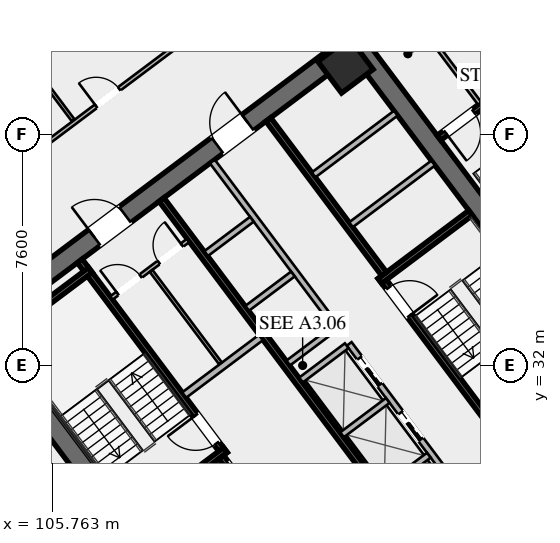
"""IFC4 building model, lengths in metres.
Left out: names, types, materials, properties, quantities, classifications, styles, units other than length and angle.
Written with IfcOpenShell. Run it as: python <this file> out.ifc"""

import sys

from ifc_helpers import new_model, si_unit, direction, frame, frame_2d, origin, origin_2d, place, context, subcontext, project, spatial, rectangle, hollow_rectangle, extrude, element, fill, save


model = new_model("IFC4")
c1 = context("Model", 3, precision=1e-05, world=origin(), true_north=direction((0.0, 1.0)))
c2 = subcontext(c1, "Body", "Model", "MODEL_VIEW")
j1 = project(units=[si_unit("LENGTHUNIT", "METRE"), si_unit("PLANEANGLEUNIT", "RADIAN")], contexts=[c1])
p1 = place(None, origin())
s1 = spatial("IfcSite", under=j1, at=p1, CompositionType="ELEMENT")
p2 = place(p1, origin())
s2 = spatial("IfcBuilding", under=s1, at=p2, CompositionType="ELEMENT")
p3 = place(p2, frame((0.0, 0.0, 67.2)))
s3 = spatial("IfcBuildingStorey", under=s2, at=p3, CompositionType="ELEMENT", Elevation=67.2)
for number, where, z_axis, x_axis in (
    (1, (112.476, 21.107, 0.0), (0.0, 0.0, 1.0), (-0.6, 0.8, 0.0)),
    (2, (115.524, 42.893, 0.0), (0.0, 0.0, 1.0), (0.6, -0.8, 0.0)),
):
    element("IfcWall", number, at=place(p3, frame(where, z_axis=z_axis, x_axis=x_axis)), inside=s3, PredefinedType="SHEAR", context=c2, shape_type="SweptSolid", body=[
        extrude(rectangle(XDim=15.6, YDim=0.65, at=frame_2d((7.8, 0.0))), origin(), (0.0, 0.0, 1.0), 3.55),
    ])
p4 = place(p3, frame((124.429, 30.478, 0.0), z_axis=(0.0, 0.0, 1.0), x_axis=(-0.799998028465, -0.600002628705, 0.0)))
e3 = element("IfcWall", 3, at=p4, inside=s3, PredefinedType="SHEAR", context=c2, shape_type="SweptSolid", body=[
    extrude(rectangle(XDim=14.86, YDim=0.65, at=frame_2d((7.43, 0.0))), origin(), (0.0, 0.0, 1.0), 3.55),
])
p5 = place(p4, frame((9.13, 0.0, 0.0)))
e4 = element("IfcOpeningElement", 4, at=p5, cuts=e3, PredefinedType="OPENING", context=c2, shape_type="SweptSolid", body=[
    extrude(rectangle(XDim=1.25, YDim=2.25, at=frame_2d((0.625, 1.125))), frame((0.0, 0.335, 0.0), z_axis=(0.0, -1.0, 0.0), x_axis=(1.0, 0.0, 0.0)), (0.0, 0.0, 1.0), 0.67),
])
p6 = place(p4, frame((4.08, 0.0, 0.0)))
e5 = element("IfcOpeningElement", 5, at=p6, cuts=e3, PredefinedType="OPENING", context=c2, shape_type="SweptSolid", body=[
    extrude(rectangle(XDim=1.25, YDim=2.25, at=frame_2d((0.625, 1.125))), frame((0.0, 0.335, 0.0), z_axis=(0.0, -1.0, 0.0), x_axis=(1.0, 0.0, 0.0)), (0.0, 0.0, 1.0), 0.67),
])
p7 = place(p3, frame((103.571, 33.522, 0.0), z_axis=(0.0, 0.0, 1.0), x_axis=(0.799998028465, 0.600002628705, 0.0)))
e6 = element("IfcWall", 6, at=p7, inside=s3, PredefinedType="SHEAR", context=c2, shape_type="SweptSolid", body=[
    extrude(rectangle(XDim=14.86, YDim=0.65, at=frame_2d((7.43, 0.0))), origin(), (0.0, 0.0, 1.0), 3.55),
])
p8 = place(p7, frame((4.48, 0.0, 0.0)))
e7 = element("IfcOpeningElement", 7, at=p8, cuts=e6, PredefinedType="OPENING", context=c2, shape_type="SweptSolid", body=[
    extrude(rectangle(XDim=1.25, YDim=2.25, at=frame_2d((0.625, 1.125))), frame((0.0, 0.335, 0.0), z_axis=(0.0, -1.0, 0.0), x_axis=(1.0, 0.0, 0.0)), (0.0, 0.0, 1.0), 0.67),
])
p9 = place(p7, frame((9.53, 0.0, 0.0)))
e8 = element("IfcOpeningElement", 8, at=p9, cuts=e6, PredefinedType="OPENING", context=c2, shape_type="SweptSolid", body=[
    extrude(rectangle(XDim=1.25, YDim=2.25, at=frame_2d((0.625, 1.125))), frame((0.0, 0.335, 0.0), z_axis=(0.0, -1.0, 0.0), x_axis=(1.0, 0.0, 0.0)), (0.0, 0.0, 1.0), 0.67),
])
p10 = place(p3, frame((115.41, 41.87, 0.0), z_axis=(0.0, 0.0, 1.0), x_axis=(0.799999996291, 0.600000004945, 0.0)))
e9 = element("IfcColumn", 9, at=p10, inside=s3, PredefinedType="COLUMN", context=c2, shape_type="SweptSolid", body=[
    extrude(hollow_rectangle(XDim=1.3, YDim=1.3, WallThickness=0.05, at=origin_2d()), origin(), (0.0, 0.0, 1.0), 3.35),
])
p11 = place(p3, frame((111.44, 29.08, 0.0), z_axis=(0.0, 0.0, 1.0), x_axis=(-0.600009827119, 0.799992629566, 0.0)))
e10 = element("IfcWall", 10, at=p11, inside=s3, PredefinedType="SHEAR", context=c2, shape_type="SweptSolid", body=[
    extrude(rectangle(XDim=7.95, YDim=0.2, at=frame_2d((3.975, 0.0))), origin(), (0.0, 0.0, 1.0), 3.35),
])
p12 = place(p11, frame((0.45, 0.0, 0.0)))
e11 = element("IfcOpeningElement", 11, at=p12, cuts=e10, PredefinedType="OPENING", context=c2, shape_type="SweptSolid", body=[
    extrude(rectangle(XDim=1.15, YDim=2.2, at=frame_2d((0.575, 1.1))), frame((0.0, 0.11, 0.0), z_axis=(0.0, -1.0, 0.0), x_axis=(1.0, 0.0, 0.0)), (0.0, 0.0, 1.0), 0.22),
])
for number, where, z_axis, x_axis in (
    (12, (108.476, 26.982, 0.0), (0.0, 0.0, 1.0), (0.8, 0.6, 0.0)),
    (13, (104.036, 32.902, 0.0), (0.0, 0.0, 1.0), (0.8, 0.6, 0.0)),
):
    element("IfcWall", number, at=place(p3, frame(where, z_axis=z_axis, x_axis=x_axis)), inside=s3, PredefinedType="SHEAR", context=c2, shape_type="SweptSolid", body=[
        extrude(rectangle(XDim=3.73, YDim=0.2, at=frame_2d((1.865, 0.0))), origin(), (0.0, 0.0, 1.0), 3.35),
    ])
p13 = place(p3, frame((116.56, 34.92, 0.0), z_axis=(0.0, 0.0, 1.0), x_axis=(0.600009827119, -0.799992629566, 0.0)))
e14 = element("IfcWall", 14, at=p13, inside=s3, PredefinedType="SHEAR", context=c2, shape_type="SweptSolid", body=[
    extrude(rectangle(XDim=7.95, YDim=0.2, at=frame_2d((3.975, 0.0))), origin(), (0.0, 0.0, 1.0), 3.35),
])
p14 = place(p13, frame((0.45, 0.0, 0.0)))
e15 = element("IfcOpeningElement", 15, at=p14, cuts=e14, PredefinedType="OPENING", context=c2, shape_type="SweptSolid", body=[
    extrude(rectangle(XDim=1.15, YDim=2.2, at=frame_2d((0.575, 1.1))), frame((0.0, 0.11, 0.0), z_axis=(0.0, -1.0, 0.0), x_axis=(1.0, 0.0, 0.0)), (0.0, 0.0, 1.0), 0.22),
])
p15 = place(p3, frame((116.54, 34.78, 0.0), z_axis=(0.0, 0.0, 1.0), x_axis=(0.799984290658, 0.600020945218, 0.0)))
e16 = element("IfcWall", 16, at=p15, inside=s3, PredefinedType="SHEAR", context=c2, shape_type="SweptSolid", body=[
    extrude(rectangle(XDim=3.73, YDim=0.2, at=frame_2d((1.865, 0.0))), origin(), (0.0, 0.0, 1.0), 3.35),
])
p16 = place(p3, frame((117.938, 26.016, 0.0), z_axis=(0.0, 0.0, 1.0), x_axis=(-0.600005463273, 0.799995902516, 0.0)))
e17 = element("IfcWall", 17, at=p16, inside=s3, PredefinedType="SHEAR", context=c2, shape_type="SweptSolid", body=[
    extrude(rectangle(XDim=14.3, YDim=0.2, at=frame_2d((7.15, 0.0))), origin(), (0.0, 0.0, 1.0), 3.35),
])
p17 = place(p3, frame((110.104, 31.028, 0.0), z_axis=(0.0, 0.0, 1.0), x_axis=(0.800018601094, 0.59997519774, 0.0)))
e18 = element("IfcWall", 18, at=p17, inside=s3, PredefinedType="SOLIDWALL", context=c2, shape_type="SweptSolid", body=[
    extrude(rectangle(XDim=3.15, YDim=0.22, at=frame_2d((1.575, 0.0))), origin(), (0.0, 0.0, 1.0), 2.703),
])
p18 = place(p3, frame((115.13, 23.91, 0.0), z_axis=(0.0, 0.0, 1.0), x_axis=(-0.599975393228, 0.800018454488, 0.0)))
e19 = element("IfcWall", 19, at=p18, inside=s3, PredefinedType="SHEAR", context=c2, shape_type="SweptSolid", body=[
    extrude(rectangle(XDim=6.35, YDim=0.2, at=frame_2d((3.175, 0.0))), origin(), (0.0, 0.0, 1.0), 3.35),
])
p19 = place(p18, frame((4.775, 0.0, 0.0)))
e20 = element("IfcOpeningElement", 20, at=p19, cuts=e19, PredefinedType="OPENING", context=c2, shape_type="SweptSolid", body=[
    extrude(rectangle(XDim=1.3, YDim=2.25, at=frame_2d((0.65, 1.125))), frame((0.0, 0.11, 0.0), z_axis=(0.0, -1.0, 0.0), x_axis=(1.0, 0.0, 0.0)), (0.0, 0.0, 1.0), 0.22),
])
p20 = place(p18, frame((2.775, 0.0, 0.0)))
e21 = element("IfcOpeningElement", 21, at=p20, cuts=e19, PredefinedType="OPENING", context=c2, shape_type="SweptSolid", body=[
    extrude(rectangle(XDim=1.3, YDim=2.25, at=frame_2d((0.65, 1.125))), frame((0.0, 0.11, 0.0), z_axis=(0.0, -1.0, 0.0), x_axis=(1.0, 0.0, 0.0)), (0.0, 0.0, 1.0), 0.22),
])
p21 = place(p18, frame((0.575, 0.0, 0.0)))
e22 = element("IfcOpeningElement", 22, at=p21, cuts=e19, PredefinedType="OPENING", context=c2, shape_type="SweptSolid", body=[
    extrude(rectangle(XDim=1.3, YDim=2.25, at=frame_2d((0.65, 1.125))), frame((0.0, 0.11, 0.0), z_axis=(0.0, -1.0, 0.0), x_axis=(1.0, 0.0, 0.0)), (0.0, 0.0, 1.0), 0.22),
])
p22 = place(p3, frame((112.87, 40.09, 0.0), z_axis=(0.0, 0.0, 1.0), x_axis=(0.599975393228, -0.800018454488, 0.0)))
e23 = element("IfcWall", 23, at=p22, inside=s3, PredefinedType="SHEAR", context=c2, shape_type="SweptSolid", body=[
    extrude(rectangle(XDim=6.35, YDim=0.2, at=frame_2d((3.175, 0.0))), origin(), (0.0, 0.0, 1.0), 3.35),
])
for number, where, z_axis, x_axis in (
    (24, (115.59, 36.63, 0.0), (0.0, 0.0, 1.0), (0.8, 0.6, 0.0)),
    (25, (114.36, 38.27, 0.0), (0.0, 0.0, 1.0), (0.8, 0.6, 0.0)),
):
    element("IfcWall", number, at=place(p3, frame(where, z_axis=z_axis, x_axis=x_axis)), inside=s3, PredefinedType="SOLIDWALL", context=c2, shape_type="SweptSolid", body=[
        extrude(rectangle(XDim=3.38, YDim=0.2, at=frame_2d((1.69, 0.0))), origin(), (0.0, 0.0, 1.0), 3.35),
    ])
p23 = place(p3, frame((107.71, 34.22, 0.0), z_axis=(0.0, 0.0, 1.0), x_axis=(0.799981399002, 0.60002480053, 0.0)))
e26 = element("IfcWall", 26, at=p23, inside=s3, PredefinedType="PARTITIONING", context=c2, shape_type="SweptSolid", body=[
    extrude(rectangle(XDim=3.15, YDim=0.135, at=frame_2d((1.575, 0.0))), origin(), (0.0, 0.0, 1.0), 2.703),
])
p24 = place(p23, frame((0.25, 0.0, 0.0)))
e27 = element("IfcOpeningElement", 27, at=p24, cuts=e26, PredefinedType="OPENING", context=c2, shape_type="SweptSolid", body=[
    extrude(rectangle(XDim=0.95, YDim=2.05, at=frame_2d((0.475, 1.025))), frame((0.0, 0.077, 0.0), z_axis=(0.0, -1.0, 0.0), x_axis=(1.0, 0.0, 0.0)), (0.0, 0.0, 1.0), 0.155),
])
p25 = place(p23, frame((1.95, 0.0, 0.0)))
e28 = element("IfcOpeningElement", 28, at=p25, cuts=e26, PredefinedType="OPENING", context=c2, shape_type="SweptSolid", body=[
    extrude(rectangle(XDim=0.95, YDim=2.05, at=frame_2d((0.475, 1.025))), frame((0.0, 0.077, 0.0), z_axis=(0.0, -1.0, 0.0), x_axis=(1.0, 0.0, 0.0)), (0.0, 0.0, 1.0), 0.155),
])
p26 = place(p3, frame((111.296, 32.072, 0.0), z_axis=(0.0, 0.0, 1.0), x_axis=(-0.59995887973, 0.800030838552, 0.0)))
e29 = element("IfcWall", 29, at=p26, inside=s3, PredefinedType="PARTITIONING", context=c2, shape_type="SweptSolid", body=[
    extrude(rectangle(XDim=3.8, YDim=0.11, at=frame_2d((1.9, 0.0))), origin(), (0.0, 0.0, 1.0), 2.703),
])
p27 = place(p3, frame((119.61, 27.27, 0.0), z_axis=(0.0, 0.0, 1.0), x_axis=(-0.600011488909, 0.79999138319, 0.0)))
e30 = element("IfcWall", 30, at=p27, inside=s3, PredefinedType="SOLIDWALL", context=c2, shape_type="SweptSolid", body=[
    extrude(rectangle(XDim=6.8, YDim=0.2, at=frame_2d((3.4, 0.0))), origin(), (0.0, 0.0, 1.0), 3.35),
])
p28 = place(p27, frame((0.625, 0.0, 0.0)))
e31 = element("IfcOpeningElement", 31, at=p28, cuts=e30, PredefinedType="OPENING", context=c2, shape_type="SweptSolid", body=[
    extrude(rectangle(XDim=1.1, YDim=2.2, at=frame_2d((0.55, 1.1))), frame((0.0, 0.11, 0.0), z_axis=(0.0, -1.0, 0.0), x_axis=(1.0, 0.0, 0.0)), (0.0, 0.0, 1.0), 0.22),
])
p29 = place(p27, frame((2.875, 0.0, 0.0)))
e32 = element("IfcOpeningElement", 32, at=p29, cuts=e30, PredefinedType="OPENING", context=c2, shape_type="SweptSolid", body=[
    extrude(rectangle(XDim=1.1, YDim=2.2, at=frame_2d((0.55, 1.1))), frame((0.0, 0.11, 0.0), z_axis=(0.0, -1.0, 0.0), x_axis=(1.0, 0.0, 0.0)), (0.0, 0.0, 1.0), 0.22),
])
p30 = place(p27, frame((5.125, 0.0, 0.0)))
e33 = element("IfcOpeningElement", 33, at=p30, cuts=e30, PredefinedType="OPENING", context=c2, shape_type="SweptSolid", body=[
    extrude(rectangle(XDim=1.1, YDim=2.2, at=frame_2d((0.55, 1.1))), frame((0.0, 0.11, 0.0), z_axis=(0.0, -1.0, 0.0), x_axis=(1.0, 0.0, 0.0)), (0.0, 0.0, 1.0), 0.22),
])
p31 = place(p3, frame((116.646, 27.922, 0.0), z_axis=(0.0, 0.0, 1.0), x_axis=(0.8, 0.6, 0.0)))
e34 = element("IfcWall", 34, at=p31, inside=s3, PredefinedType="SOLIDWALL", context=c2, shape_type="SweptSolid", body=[
    extrude(rectangle(XDim=1.88, YDim=0.2, at=frame_2d((0.94, 0.0))), origin(), (0.0, 0.0, 1.0), 3.35),
])
p32 = place(p3, frame((115.296, 29.722, 0.0), z_axis=(0.0, 0.0, 1.0), x_axis=(0.799984418148, 0.600020775241, 0.0)))
e35 = element("IfcWall", 35, at=p32, inside=s3, PredefinedType="SOLIDWALL", context=c2, shape_type="SweptSolid", body=[
    extrude(rectangle(XDim=1.88, YDim=0.2, at=frame_2d((0.94, 0.0))), origin(), (0.0, 0.0, 1.0), 3.35),
])
p33 = place(p3, frame((113.946, 31.522, 0.0), z_axis=(0.0, 0.0, 1.0), x_axis=(0.8, 0.6, 0.0)))
e36 = element("IfcWall", 36, at=p33, inside=s3, PredefinedType="SOLIDWALL", context=c2, shape_type="SweptSolid", body=[
    extrude(rectangle(XDim=1.88, YDim=0.2, at=frame_2d((0.94, 0.0))), origin(), (0.0, 0.0, 1.0), 3.35),
])
p34 = place(p3, frame((115.11, 33.27, 0.0), z_axis=(0.0, 0.0, 1.0), x_axis=(-0.600011488909, 0.79999138319, 0.0)))
e37 = element("IfcWall", 37, at=p34, inside=s3, PredefinedType="SOLIDWALL", context=c2, shape_type="SweptSolid", body=[
    extrude(rectangle(XDim=6.8, YDim=0.2, at=frame_2d((3.4, 0.0))), origin(), (0.0, 0.0, 1.0), 3.35),
])
p35 = place(p3, frame((113.526, 32.082, 0.0), z_axis=(0.0, 0.0, 1.0), x_axis=(0.800046745961, 0.599937666993, 0.0)))
e38 = element("IfcWall", 38, at=p35, inside=s3, PredefinedType="SOLIDWALL", context=c2, shape_type="SweptSolid", body=[
    extrude(rectangle(XDim=1.88, YDim=0.2, at=frame_2d((0.94, 0.0))), origin(), (0.0, 0.0, 1.0), 3.35),
])
p36 = place(p3, frame((112.176, 33.882, 0.0), z_axis=(0.0, 0.0, 1.0), x_axis=(0.8, 0.6, 0.0)))
e39 = element("IfcWall", 39, at=p36, inside=s3, PredefinedType="SOLIDWALL", context=c2, shape_type="SweptSolid", body=[
    extrude(rectangle(XDim=1.88, YDim=0.2, at=frame_2d((0.94, 0.0))), origin(), (0.0, 0.0, 1.0), 3.35),
])
p37 = place(p3, frame((110.826, 35.682, 0.0), z_axis=(0.0, 0.0, 1.0), x_axis=(0.799984418148, 0.600020775241, 0.0)))
e40 = element("IfcWall", 40, at=p37, inside=s3, PredefinedType="SOLIDWALL", context=c2, shape_type="SweptSolid", body=[
    extrude(rectangle(XDim=1.88, YDim=0.2, at=frame_2d((0.94, 0.0))), origin(), (0.0, 0.0, 1.0), 3.35),
])
p38 = place(p3, frame((121.204, 41.528, 0.0), z_axis=(0.0, 0.0, 1.0), x_axis=(-0.800017232136, -0.599977023131, 0.0)))
e41 = element("IfcWall", 41, at=p38, inside=s3, PredefinedType="SHEAR", context=c2, shape_type="SweptSolid", body=[
    extrude(rectangle(XDim=3.4, YDim=0.2, at=frame_2d((1.7, 0.0))), origin(), (0.0, 0.0, 1.0), 3.35),
])
p39 = place(p38, frame((1.975, 0.0, 0.0)))
e42 = element("IfcOpeningElement", 42, at=p39, cuts=e41, PredefinedType="OPENING", context=c2, shape_type="SweptSolid", body=[
    extrude(rectangle(XDim=1.15, YDim=2.2, at=frame_2d((0.575, 1.1))), frame((0.0, 0.11, 0.0), z_axis=(0.0, -1.0, 0.0), x_axis=(1.0, 0.0, 0.0)), (0.0, 0.0, 1.0), 0.22),
])
p40 = place(p3, frame((119.824, 40.618, 0.0), z_axis=(0.0, 0.0, 1.0), x_axis=(-0.599982243973, 0.800013316712, 0.0)))
e43 = element("IfcWall", 43, at=p40, inside=s3, PredefinedType="PARTITIONING", context=c2, shape_type="SweptSolid", body=[
    extrude(rectangle(XDim=4.4, YDim=0.135, at=frame_2d((2.2, 0.0))), origin(), (0.0, 0.0, 1.0), 2.703),
])
p41 = place(p3, frame((98.516, 34.012, 0.0), z_axis=(0.0, 0.0, 1.0), x_axis=(0.8, 0.6, 0.0)))
e44 = element("IfcWall", 44, at=p41, inside=s3, PredefinedType="PARTITIONING", context=c2, shape_type="SweptSolid", body=[
    extrude(rectangle(XDim=28.23, YDim=0.135, at=frame_2d((14.115, 0.0))), origin(), (0.0, 0.0, 1.0), 2.703),
])
p42 = place(p41, frame((0.3, 0.0, 0.0)))
e45 = element("IfcOpeningElement", 45, at=p42, cuts=e44, PredefinedType="OPENING", context=c2, shape_type="SweptSolid", body=[
    extrude(rectangle(XDim=0.95, YDim=2.05, at=frame_2d((0.475, 1.025))), frame((0.0, 0.077, 0.0), z_axis=(0.0, -1.0, 0.0), x_axis=(1.0, 0.0, 0.0)), (0.0, 0.0, 1.0), 0.155),
])
p43 = place(p41, frame((6.84, 0.0, 0.0)))
e46 = element("IfcOpeningElement", 46, at=p43, cuts=e44, PredefinedType="OPENING", context=c2, shape_type="SweptSolid", body=[
    extrude(rectangle(XDim=0.95, YDim=2.05, at=frame_2d((0.475, 1.025))), frame((0.0, 0.077, 0.0), z_axis=(0.0, -1.0, 0.0), x_axis=(1.0, 0.0, 0.0)), (0.0, 0.0, 1.0), 0.155),
])
p44 = place(p41, frame((10.863, 0.0, 0.0)))
e47 = element("IfcOpeningElement", 47, at=p44, cuts=e44, PredefinedType="OPENING", context=c2, shape_type="SweptSolid", body=[
    extrude(rectangle(XDim=0.95, YDim=2.05, at=frame_2d((0.475, 1.025))), frame((0.0, 0.077, 0.0), z_axis=(0.0, -1.0, 0.0), x_axis=(1.0, 0.0, 0.0)), (0.0, 0.0, 1.0), 0.155),
])
p45 = place(p41, frame((26.98, 0.0, 0.0)))
e48 = element("IfcOpeningElement", 48, at=p45, cuts=e44, PredefinedType="OPENING", context=c2, shape_type="SweptSolid", body=[
    extrude(rectangle(XDim=0.95, YDim=2.05, at=frame_2d((0.475, 1.025))), frame((0.0, 0.077, 0.0), z_axis=(0.0, -1.0, 0.0), x_axis=(1.0, 0.0, 0.0)), (0.0, 0.0, 1.0), 0.155),
])
p46 = place(p3, frame((106.452, 40.064, 0.0), z_axis=(0.0, 0.0, 1.0), x_axis=(-0.599982443676, 0.800013166942, 0.0)))
e49 = element("IfcWall", 49, at=p46, inside=s3, PredefinedType="PARTITIONING", context=c2, shape_type="SweptSolid", body=[
    extrude(rectangle(XDim=8.9, YDim=0.11, at=frame_2d((4.45, 0.0))), origin(), (0.0, 0.0, 1.0), 2.703),
])
p47 = place(p3, frame((134.18, 33.51, 0.0), z_axis=(0.0, 0.0, 1.0), x_axis=(-0.8, -0.6, 0.0)))
e50 = element("IfcWall", 50, at=p47, inside=s3, PredefinedType="PARTITIONING", context=c2, shape_type="SweptSolid", body=[
    extrude(rectangle(XDim=28.23, YDim=0.135, at=frame_2d((14.115, 0.0))), origin(), (0.0, 0.0, 1.0), 2.703),
])
p48 = place(p47, frame((26.9, 0.0, 0.0)))
e51 = element("IfcOpeningElement", 51, at=p48, cuts=e50, PredefinedType="OPENING", context=c2, shape_type="SweptSolid", body=[
    extrude(rectangle(XDim=0.95, YDim=2.05, at=frame_2d((0.475, 1.025))), frame((0.0, 0.077, 0.0), z_axis=(0.0, -1.0, 0.0), x_axis=(1.0, 0.0, 0.0)), (0.0, 0.0, 1.0), 0.155),
])
p49 = place(p47, frame((20.399, 0.0, 0.0)))
e52 = element("IfcOpeningElement", 52, at=p49, cuts=e50, PredefinedType="OPENING", context=c2, shape_type="SweptSolid", body=[
    extrude(rectangle(XDim=0.95, YDim=2.05, at=frame_2d((0.475, 1.025))), frame((0.0, 0.077, 0.0), z_axis=(0.0, -1.0, 0.0), x_axis=(1.0, 0.0, 0.0)), (0.0, 0.0, 1.0), 0.155),
])
p50 = place(p47, frame((16.339, 0.0, 0.0)))
e53 = element("IfcOpeningElement", 53, at=p50, cuts=e50, PredefinedType="OPENING", context=c2, shape_type="SweptSolid", body=[
    extrude(rectangle(XDim=0.95, YDim=2.05, at=frame_2d((0.475, 1.025))), frame((0.0, 0.077, 0.0), z_axis=(0.0, -1.0, 0.0), x_axis=(1.0, 0.0, 0.0)), (0.0, 0.0, 1.0), 0.155),
])
p51 = place(p47, frame((0.38, 0.0, 0.0)))
e54 = element("IfcOpeningElement", 54, at=p51, cuts=e50, PredefinedType="OPENING", context=c2, shape_type="SweptSolid", body=[
    extrude(rectangle(XDim=0.95, YDim=2.05, at=frame_2d((0.475, 1.025))), frame((0.0, 0.077, 0.0), z_axis=(0.0, -1.0, 0.0), x_axis=(1.0, 0.0, 0.0)), (0.0, 0.0, 1.0), 0.155),
])
p52 = place(p3, frame((111.548, 16.636, 0.0), z_axis=(0.0, 0.0, 1.0), x_axis=(-0.600003610192, 0.799997292343, 0.0)))
e55 = element("IfcWall", 55, at=p52, inside=s3, PredefinedType="PARTITIONING", context=c2, shape_type="SweptSolid", body=[
    extrude(rectangle(XDim=21.64, YDim=0.135, at=frame_2d((10.82, 0.0))), origin(), (0.0, 0.0, 1.0), 2.703),
])
p53 = place(p52, frame((0.3, 0.0, 0.0)))
e56 = element("IfcOpeningElement", 56, at=p53, cuts=e55, PredefinedType="OPENING", context=c2, shape_type="SweptSolid", body=[
    extrude(rectangle(XDim=0.95, YDim=2.05, at=frame_2d((0.475, 1.025))), frame((0.0, 0.077, 0.0), z_axis=(0.0, -1.0, 0.0), x_axis=(1.0, 0.0, 0.0)), (0.0, 0.0, 1.0), 0.155),
])
p54 = place(p8, origin())
e57 = element("IfcDoor", 57, at=p54, inside=s3, OperationType="SINGLE_SWING_LEFT", PredefinedType="DOOR", context=c2, shape_type="SweptSolid", body=[
    extrude(rectangle(XDim=1.25, YDim=2.25, at=frame_2d((0.625, 1.125))), frame((0.0, 0.025, 0.0), z_axis=(0.0, -1.0, 0.0), x_axis=(1.0, 0.0, 0.0)), (0.0, 0.0, 1.0), 0.05),
])
fill(e7, e57)
p55 = place(p9, origin())
e58 = element("IfcDoor", 58, at=p55, inside=s3, OperationType="SINGLE_SWING_RIGHT", PredefinedType="DOOR", context=c2, shape_type="SweptSolid", body=[
    extrude(rectangle(XDim=1.25, YDim=2.25, at=frame_2d((0.625, 1.125))), frame((0.0, 0.025, 0.0), z_axis=(0.0, -1.0, 0.0), x_axis=(1.0, 0.0, 0.0)), (0.0, 0.0, 1.0), 0.05),
])
fill(e8, e58)
p56 = place(p12, origin())
e59 = element("IfcDoor", 59, at=p56, inside=s3, OperationType="SINGLE_SWING_RIGHT", PredefinedType="DOOR", context=c2, shape_type="SweptSolid", body=[
    extrude(rectangle(XDim=1.15, YDim=2.2, at=frame_2d((0.575, 1.1))), frame((0.0, 0.025, 0.0), z_axis=(0.0, -1.0, 0.0), x_axis=(1.0, 0.0, 0.0)), (0.0, 0.0, 1.0), 0.05),
])
fill(e11, e59)
p57 = place(p14, origin())
e60 = element("IfcDoor", 60, at=p57, inside=s3, OperationType="SINGLE_SWING_RIGHT", PredefinedType="DOOR", context=c2, shape_type="SweptSolid", body=[
    extrude(rectangle(XDim=1.15, YDim=2.2, at=frame_2d((0.575, 1.1))), frame((0.0, 0.025, 0.0), z_axis=(0.0, -1.0, 0.0), x_axis=(1.0, 0.0, 0.0)), (0.0, 0.0, 1.0), 0.05),
])
fill(e15, e60)
p58 = place(p24, origin())
e61 = element("IfcDoor", 61, at=p58, inside=s3, OperationType="SINGLE_SWING_LEFT", PredefinedType="DOOR", context=c2, shape_type="SweptSolid", body=[
    extrude(rectangle(XDim=0.95, YDim=2.05, at=frame_2d((0.475, 1.025))), frame((0.0, 0.025, 0.0), z_axis=(0.0, -1.0, 0.0), x_axis=(1.0, 0.0, 0.0)), (0.0, 0.0, 1.0), 0.05),
])
fill(e27, e61)
p59 = place(p25, origin())
e62 = element("IfcDoor", 62, at=p59, inside=s3, OperationType="SINGLE_SWING_RIGHT", PredefinedType="DOOR", context=c2, shape_type="SweptSolid", body=[
    extrude(rectangle(XDim=0.95, YDim=2.05, at=frame_2d((0.475, 1.025))), frame((0.0, 0.025, 0.0), z_axis=(0.0, -1.0, 0.0), x_axis=(1.0, 0.0, 0.0)), (0.0, 0.0, 1.0), 0.05),
])
fill(e28, e62)
p60 = place(p39, origin())
e63 = element("IfcDoor", 63, at=p60, inside=s3, OperationType="SINGLE_SWING_RIGHT", PredefinedType="DOOR", context=c2, shape_type="SweptSolid", body=[
    extrude(rectangle(XDim=1.15, YDim=2.2, at=frame_2d((0.575, 1.1))), frame((0.0, 0.025, 0.0), z_axis=(0.0, -1.0, 0.0), x_axis=(1.0, 0.0, 0.0)), (0.0, 0.0, 1.0), 0.05),
])
fill(e42, e63)
p61 = place(p44, origin())
e64 = element("IfcDoor", 64, at=p61, inside=s3, OperationType="SINGLE_SWING_LEFT", PredefinedType="DOOR", context=c2, shape_type="SweptSolid", body=[
    extrude(rectangle(XDim=0.95, YDim=2.05, at=frame_2d((0.475, 1.025))), frame((0.0, 0.025, 0.0), z_axis=(0.0, -1.0, 0.0), x_axis=(1.0, 0.0, 0.0)), (0.0, 0.0, 1.0), 0.05),
])
fill(e47, e64)
p62 = place(p29, origin())
e65 = element("IfcDoor", 65, at=p62, inside=s3, OperationType="SLIDING_TO_LEFT", PredefinedType="DOOR", context=c2, shape_type="SweptSolid", body=[
    extrude(rectangle(XDim=1.1, YDim=2.2, at=frame_2d((0.55, 1.1))), frame((0.0, 0.025, 0.0), z_axis=(0.0, -1.0, 0.0), x_axis=(1.0, 0.0, 0.0)), (0.0, 0.0, 1.0), 0.05),
])
fill(e32, e65)
p63 = place(p30, origin())
e66 = element("IfcDoor", 66, at=p63, inside=s3, OperationType="SLIDING_TO_LEFT", PredefinedType="DOOR", context=c2, shape_type="SweptSolid", body=[
    extrude(rectangle(XDim=1.1, YDim=2.2, at=frame_2d((0.55, 1.1))), frame((0.0, 0.025, 0.0), z_axis=(0.0, -1.0, 0.0), x_axis=(1.0, 0.0, 0.0)), (0.0, 0.0, 1.0), 0.05),
])
fill(e33, e66)
save(model, sys.argv[1])
